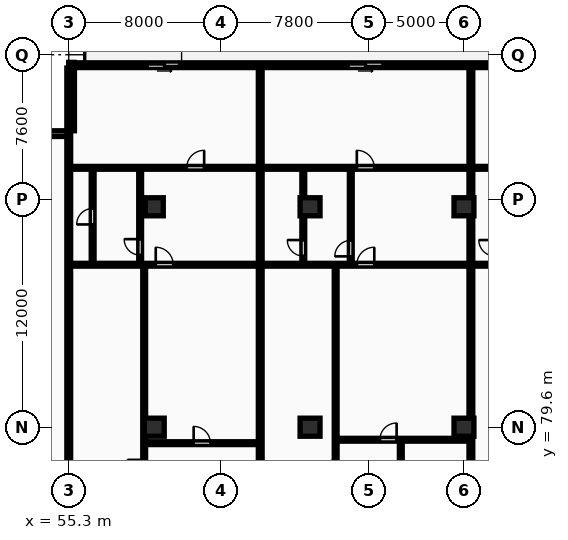
"""IFC4 building model, lengths in metres.
Left out: names, types, materials, properties, quantities, classifications, styles, units other than length and angle.
Written with IfcOpenShell. Run it as: python <this file> out.ifc"""

import sys

from ifc_helpers import new_model, si_unit, direction, frame, frame_2d, origin, origin_2d, place, context, subcontext, project, spatial, rectangle, circle, extrude, element, fill, save


model = new_model("IFC4")
c1 = context("Model", 3, precision=1e-05, world=origin(), true_north=direction((0.0, 1.0)))
c2 = subcontext(c1, "Body", "Model", "MODEL_VIEW")
j1 = project(units=[si_unit("LENGTHUNIT", "METRE"), si_unit("PLANEANGLEUNIT", "RADIAN")], contexts=[c1])
p1 = place(None, origin())
s1 = spatial("IfcSite", under=j1, at=p1, CompositionType="ELEMENT")
p2 = place(p1, origin())
s2 = spatial("IfcBuilding", under=s1, at=p2, CompositionType="ELEMENT")
p3 = place(p2, frame((0.0, 0.0, 24.0)))
s3 = spatial("IfcBuildingStorey", under=s2, at=p3, CompositionType="ELEMENT", Elevation=24.0)
p4 = place(p3, frame((59.8, 79.6, 0.0), z_axis=(0.0, 0.0, 1.0), x_axis=(1.0, 0.0, 0.0)))
e1 = element("IfcColumn", 1, at=p4, inside=s3, PredefinedType="COLUMN", context=c2, shape_type="SweptSolid", body=[
    extrude(rectangle(XDim=1.05, YDim=0.95, at=origin_2d()), origin(), (0.0, 0.0, 1.0), 3.25),
])
p5 = place(p3, frame((59.8, 91.2, 0.0), z_axis=(0.0, 0.0, 1.0), x_axis=(1.0, 0.0, 0.0)))
e2 = element("IfcColumn", 2, at=p5, inside=s3, PredefinedType="COLUMN", context=c2, shape_type="SweptSolid", body=[
    extrude(circle(Radius=0.475, at=origin_2d()), origin(), (0.0, 0.0, 1.0), 3.25),
])
for number, where, z_axis, x_axis in (
    (3, (68.0, 79.6, 0.0), (0.0, 0.0, 1.0), (1.0, 0.0, 0.0)),
    (4, (68.0, 91.2, 0.0), (0.0, 0.0, 1.0), (1.0, 0.0, 0.0)),
    (5, (76.1, 79.6, 0.0), (0.0, 0.0, 1.0), (1.0, 0.0, 0.0)),
    (6, (76.1, 91.2, 0.0), (0.0, 0.0, 1.0), (1.0, 0.0, 0.0)),
):
    element("IfcColumn", number, at=place(p3, frame(where, z_axis=z_axis, x_axis=x_axis)), inside=s3, PredefinedType="COLUMN", context=c2, shape_type="SweptSolid", body=[
        extrude(rectangle(XDim=1.05, YDim=0.95, at=origin_2d()), origin(), (0.0, 0.0, 1.0), 3.25),
    ])
p6 = place(p3, frame((132.9, 98.65, 0.0), z_axis=(0.0, 0.0, 1.0), x_axis=(-1.0, 0.0, 0.0)))
e7 = element("IfcWall", 7, at=p6, inside=s3, PredefinedType="STANDARD", context=c2, shape_type="SweptSolid", body=[
    extrude(rectangle(XDim=77.6, YDim=0.25, at=frame_2d((38.8, 0.0))), origin(), (0.0, 0.0, 1.0), 2.97),
])
p7 = place(p6, frame((71.661, 0.0, 0.0)))
e8 = element("IfcOpeningElement", 8, at=p7, cuts=e7, PredefinedType="OPENING", context=c2, shape_type="SweptSolid", body=[
    extrude(rectangle(XDim=1.8, YDim=2.2, at=frame_2d((0.9, 1.1))), frame((0.0, 0.135, 0.0), z_axis=(0.0, -1.0, 0.0), x_axis=(1.0, 0.0, 0.0)), (0.0, 0.0, 1.0), 0.27),
])
p8 = place(p6, frame((61.079, 0.0, 0.0)))
e9 = element("IfcOpeningElement", 9, at=p8, cuts=e7, PredefinedType="OPENING", context=c2, shape_type="SweptSolid", body=[
    extrude(rectangle(XDim=1.8, YDim=2.2, at=frame_2d((0.9, 1.1))), frame((0.0, 0.135, 0.0), z_axis=(0.0, -1.0, 0.0), x_axis=(1.0, 0.0, 0.0)), (0.0, 0.0, 1.0), 0.27),
])
p9 = place(p6, frame((50.498, 0.0, 0.0)))
e10 = element("IfcOpeningElement", 10, at=p9, cuts=e7, PredefinedType="OPENING", context=c2, shape_type="SweptSolid", body=[
    extrude(rectangle(XDim=1.8, YDim=2.2, at=frame_2d((0.9, 1.1))), frame((0.0, 0.135, 0.0), z_axis=(0.0, -1.0, 0.0), x_axis=(1.0, 0.0, 0.0)), (0.0, 0.0, 1.0), 0.27),
])
p10 = place(p6, frame((39.412, 0.0, 0.0)))
e11 = element("IfcOpeningElement", 11, at=p10, cuts=e7, PredefinedType="OPENING", context=c2, shape_type="SweptSolid", body=[
    extrude(rectangle(XDim=1.8, YDim=2.2, at=frame_2d((0.9, 1.1))), frame((0.0, 0.135, 0.0), z_axis=(0.0, -1.0, 0.0), x_axis=(1.0, 0.0, 0.0)), (0.0, 0.0, 1.0), 0.27),
])
p11 = place(p6, frame((28.326, 0.0, 0.0)))
e12 = element("IfcOpeningElement", 12, at=p11, cuts=e7, PredefinedType="OPENING", context=c2, shape_type="SweptSolid", body=[
    extrude(rectangle(XDim=1.8, YDim=2.2, at=frame_2d((0.9, 1.1))), frame((0.0, 0.135, 0.0), z_axis=(0.0, -1.0, 0.0), x_axis=(1.0, 0.0, 0.0)), (0.0, 0.0, 1.0), 0.27),
])
p12 = place(p6, frame((17.744, 0.0, 0.0)))
e13 = element("IfcOpeningElement", 13, at=p12, cuts=e7, PredefinedType="OPENING", context=c2, shape_type="SweptSolid", body=[
    extrude(rectangle(XDim=1.8, YDim=2.2, at=frame_2d((0.9, 1.1))), frame((0.0, 0.135, 0.0), z_axis=(0.0, -1.0, 0.0), x_axis=(1.0, 0.0, 0.0)), (0.0, 0.0, 1.0), 0.27),
])
p13 = place(p6, frame((6.901, 0.0, 0.0)))
e14 = element("IfcOpeningElement", 14, at=p13, cuts=e7, PredefinedType="OPENING", context=c2, shape_type="SweptSolid", body=[
    extrude(rectangle(XDim=1.8, YDim=2.2, at=frame_2d((0.9, 1.1))), frame((0.0, 0.135, 0.0), z_axis=(0.0, -1.0, 0.0), x_axis=(1.0, 0.0, 0.0)), (0.0, 0.0, 1.0), 0.27),
])
p14 = place(p6, frame((0.6, 0.0, 0.85)))
e15 = element("IfcOpeningElement", 15, at=p14, cuts=e7, PredefinedType="OPENING", context=c2, shape_type="SweptSolid", body=[
    extrude(rectangle(XDim=1.8, YDim=1.8, at=frame_2d((0.9, 0.9))), frame((0.0, 0.135, 0.0), z_axis=(0.0, -1.0, 0.0), x_axis=(1.0, 0.0, 0.0)), (0.0, 0.0, 1.0), 0.27),
])
for number, where, z_axis, x_axis in (
    (16, (55.45, 98.8, 0.0), (0.0, 0.0, 1.0), (0.0, -1.0, 0.0)),
    (17, (55.3, 95.05, 0.0), (0.0, 0.0, 1.0), (-1.0, 0.0, 0.0)),
):
    element("IfcWall", number, at=place(p3, frame(where, z_axis=z_axis, x_axis=x_axis)), inside=s3, PredefinedType="STANDARD", context=c2, shape_type="SweptSolid", body=[
        extrude(rectangle(XDim=3.6, YDim=0.3, at=frame_2d((1.8, 0.0))), origin(), (0.0, 0.0, 1.0), 2.97),
    ])
for number, where, z_axis, x_axis in (
    (18, (55.3, 69.43, 0.0), (0.0, 0.0, 1.0), (0.0, 1.0, 0.0)),
    (19, (65.378, 69.43, 0.0), (0.0, 0.0, 1.0), (0.0, 1.0, 0.0)),
):
    element("IfcWall", number, at=place(p3, frame(where, z_axis=z_axis, x_axis=x_axis)), inside=s3, PredefinedType="PARTITIONING", context=c2, shape_type="SweptSolid", body=[
        extrude(rectangle(XDim=29.07, YDim=0.2, at=frame_2d((14.535, 0.0))), origin(), (0.0, 0.0, 1.0), 2.97),
    ])
p15 = place(p3, frame((59.33, 78.76, 0.0), z_axis=(0.0, 0.0, 1.0), x_axis=(1.0, 0.0, 0.0)))
e20 = element("IfcWall", 20, at=p15, inside=s3, PredefinedType="PARTITIONING", context=c2, shape_type="SweptSolid", body=[
    extrude(rectangle(XDim=5.968, YDim=0.15, at=frame_2d((2.984, 0.0))), origin(), (0.0, 0.0, 1.0), 2.97),
])
p16 = place(p15, frame((2.544, 0.0, 0.0)))
e21 = element("IfcOpeningElement", 21, at=p16, cuts=e20, PredefinedType="OPENING", context=c2, shape_type="SweptSolid", body=[
    extrude(rectangle(XDim=0.88, YDim=2.06, at=frame_2d((0.44, 1.03))), frame((0.0, 0.085, 0.0), z_axis=(0.0, -1.0, 0.0), x_axis=(1.0, 0.0, 0.0)), (0.0, 0.0, 1.0), 0.17),
])
p17 = place(p3, frame((59.27, 69.41, 0.0), z_axis=(0.0, 0.0, 1.0), x_axis=(0.0, 1.0, 0.0)))
e22 = element("IfcWall", 22, at=p17, inside=s3, PredefinedType="PARTITIONING", context=c2, shape_type="SweptSolid", body=[
    extrude(rectangle(XDim=18.7, YDim=0.15, at=frame_2d((9.35, 0.0))), origin(), (0.0, 0.0, 1.0), 2.97),
])
p18 = place(p17, frame((7.59, 0.0, 0.0)))
e23 = element("IfcOpeningElement", 23, at=p18, cuts=e22, PredefinedType="OPENING", context=c2, shape_type="SweptSolid", body=[
    extrude(rectangle(XDim=0.88, YDim=2.06, at=frame_2d((0.44, 1.03))), frame((0.0, 0.085, 0.0), z_axis=(0.0, -1.0, 0.0), x_axis=(1.0, 0.0, 0.0)), (0.0, 0.0, 1.0), 0.17),
])
p19 = place(p3, frame((56.558, 88.19, 0.0), z_axis=(0.0, 0.0, 1.0), x_axis=(0.0, 1.0, 0.0)))
e24 = element("IfcWall", 24, at=p19, inside=s3, PredefinedType="PARTITIONING", context=c2, shape_type="SweptSolid", body=[
    extrude(rectangle(XDim=5.0, YDim=0.15, at=frame_2d((2.5, 0.0))), origin(), (0.0, 0.0, 1.0), 2.97),
])
p20 = place(p19, frame((2.08, 0.0, 0.0)))
e25 = element("IfcOpeningElement", 25, at=p20, cuts=e24, PredefinedType="OPENING", context=c2, shape_type="SweptSolid", body=[
    extrude(rectangle(XDim=0.84, YDim=2.04, at=frame_2d((0.42, 1.02))), frame((0.0, 0.085, 0.0), z_axis=(0.0, -1.0, 0.0), x_axis=(1.0, 0.0, 0.0)), (0.0, 0.0, 1.0), 0.17),
])
p21 = place(p3, frame((59.058, 88.19, 0.0), z_axis=(0.0, 0.0, 1.0), x_axis=(0.0, 1.0, 0.0)))
e26 = element("IfcWall", 26, at=p21, inside=s3, PredefinedType="PARTITIONING", context=c2, shape_type="SweptSolid", body=[
    extrude(rectangle(XDim=5.0, YDim=0.15, at=frame_2d((2.5, 0.0))), origin(), (0.0, 0.0, 1.0), 2.97),
])
p22 = place(p21, frame((0.467, 0.0, 0.0)))
e27 = element("IfcOpeningElement", 27, at=p22, cuts=e26, PredefinedType="OPENING", context=c2, shape_type="SweptSolid", body=[
    extrude(rectangle(XDim=0.84, YDim=2.04, at=frame_2d((0.42, 1.02))), frame((0.0, 0.085, 0.0), z_axis=(0.0, -1.0, 0.0), x_axis=(1.0, 0.0, 0.0)), (0.0, 0.0, 1.0), 0.17),
])
p23 = place(p3, frame((55.38, 88.15, 0.0), z_axis=(0.0, 0.0, 1.0), x_axis=(1.0, 0.0, 0.0)))
e28 = element("IfcWall", 28, at=p23, inside=s3, PredefinedType="PARTITIONING", context=c2, shape_type="SweptSolid", body=[
    extrude(rectangle(XDim=9.918, YDim=0.15, at=frame_2d((4.959, 0.0))), origin(), (0.0, 0.0, 1.0), 2.97),
])
p24 = place(p23, frame((4.499, 0.0, 0.0)))
e29 = element("IfcOpeningElement", 29, at=p24, cuts=e28, PredefinedType="OPENING", context=c2, shape_type="SweptSolid", body=[
    extrude(rectangle(XDim=0.92, YDim=2.08, at=frame_2d((0.46, 1.04))), frame((0.0, 0.085, 0.0), z_axis=(0.0, -1.0, 0.0), x_axis=(1.0, 0.0, 0.0)), (0.0, 0.0, 1.0), 0.17),
])
p25 = place(p3, frame((55.38, 93.25, 0.0), z_axis=(0.0, 0.0, 1.0), x_axis=(1.0, 0.0, 0.0)))
e30 = element("IfcWall", 30, at=p25, inside=s3, PredefinedType="PARTITIONING", context=c2, shape_type="SweptSolid", body=[
    extrude(rectangle(XDim=9.918, YDim=0.15, at=frame_2d((4.959, 0.0))), origin(), (0.0, 0.0, 1.0), 2.97),
])
p26 = place(p25, frame((6.127, 0.0, 0.0)))
e31 = element("IfcOpeningElement", 31, at=p26, cuts=e30, PredefinedType="OPENING", context=c2, shape_type="SweptSolid", body=[
    extrude(rectangle(XDim=0.92, YDim=2.08, at=frame_2d((0.46, 1.04))), frame((0.0, 0.085, 0.0), z_axis=(0.0, -1.0, 0.0), x_axis=(1.0, 0.0, 0.0)), (0.0, 0.0, 1.0), 0.17),
])
p27 = place(p3, frame((76.464, 69.43, 0.0), z_axis=(0.0, 0.0, 1.0), x_axis=(0.0, 1.0, 0.0)))
e32 = element("IfcWall", 32, at=p27, inside=s3, PredefinedType="PARTITIONING", context=c2, shape_type="SweptSolid", body=[
    extrude(rectangle(XDim=29.07, YDim=0.2, at=frame_2d((14.535, 0.0))), origin(), (0.0, 0.0, 1.0), 2.22),
])
p28 = place(p3, frame((72.776, 69.41, 0.0), z_axis=(0.0, 0.0, 1.0), x_axis=(0.0, 1.0, 0.0)))
e33 = element("IfcWall", 33, at=p28, inside=s3, PredefinedType="PARTITIONING", context=c2, shape_type="SweptSolid", body=[
    extrude(rectangle(XDim=9.53, YDim=0.15, at=frame_2d((4.765, 0.0))), origin(), (0.0, 0.0, 1.0), 2.97),
])
p29 = place(p28, frame((4.345, 0.0, 0.0)))
e34 = element("IfcOpeningElement", 34, at=p29, cuts=e33, PredefinedType="OPENING", context=c2, shape_type="SweptSolid", body=[
    extrude(rectangle(XDim=0.84, YDim=2.04, at=frame_2d((0.42, 1.02))), frame((0.0, 0.085, 0.0), z_axis=(0.0, -1.0, 0.0), x_axis=(1.0, 0.0, 0.0)), (0.0, 0.0, 1.0), 0.17),
])
p30 = place(p3, frame((69.408, 78.94, 0.0), z_axis=(0.0, 0.0, 1.0), x_axis=(1.0, 0.0, 0.0)))
e35 = element("IfcWall", 35, at=p30, inside=s3, PredefinedType="PARTITIONING", context=c2, shape_type="SweptSolid", body=[
    extrude(rectangle(XDim=6.976, YDim=0.15, at=frame_2d((3.488, 0.0))), origin(), (0.0, 0.0, 1.0), 2.97),
])
p31 = place(p30, frame((2.268, 0.0, 0.0)))
e36 = element("IfcOpeningElement", 36, at=p31, cuts=e35, PredefinedType="OPENING", context=c2, shape_type="SweptSolid", body=[
    extrude(rectangle(XDim=0.88, YDim=2.06, at=frame_2d((0.44, 1.03))), frame((0.0, 0.085, 0.0), z_axis=(0.0, -1.0, 0.0), x_axis=(1.0, 0.0, 0.0)), (0.0, 0.0, 1.0), 0.17),
])
p32 = place(p3, frame((69.348, 69.41, 0.0), z_axis=(0.0, 0.0, 1.0), x_axis=(0.0, 1.0, 0.0)))
e37 = element("IfcWall", 37, at=p32, inside=s3, PredefinedType="PARTITIONING", context=c2, shape_type="SweptSolid", body=[
    extrude(rectangle(XDim=18.7, YDim=0.15, at=frame_2d((9.35, 0.0))), origin(), (0.0, 0.0, 1.0), 2.97),
])
p33 = place(p32, frame((7.595, 0.0, 0.0)))
e38 = element("IfcOpeningElement", 38, at=p33, cuts=e37, PredefinedType="OPENING", context=c2, shape_type="SweptSolid", body=[
    extrude(rectangle(XDim=0.88, YDim=2.06, at=frame_2d((0.44, 1.03))), frame((0.0, 0.085, 0.0), z_axis=(0.0, -1.0, 0.0), x_axis=(1.0, 0.0, 0.0)), (0.0, 0.0, 1.0), 0.17),
])
p34 = place(p3, frame((67.644, 88.19, 0.0), z_axis=(0.0, 0.0, 1.0), x_axis=(0.0, 1.0, 0.0)))
e39 = element("IfcWall", 39, at=p34, inside=s3, PredefinedType="PARTITIONING", context=c2, shape_type="SweptSolid", body=[
    extrude(rectangle(XDim=5.0, YDim=0.15, at=frame_2d((2.5, 0.0))), origin(), (0.0, 0.0, 1.0), 2.22),
])
p35 = place(p34, frame((0.419, 0.0, 0.0)))
e40 = element("IfcOpeningElement", 40, at=p35, cuts=e39, PredefinedType="OPENING", context=c2, shape_type="SweptSolid", body=[
    extrude(rectangle(XDim=0.84, YDim=2.04, at=frame_2d((0.42, 1.02))), frame((0.0, 0.085, 0.0), z_axis=(0.0, -1.0, 0.0), x_axis=(1.0, 0.0, 0.0)), (0.0, 0.0, 1.0), 0.17),
])
p36 = place(p3, frame((70.144, 88.19, 0.0), z_axis=(0.0, 0.0, 1.0), x_axis=(0.0, 1.0, 0.0)))
e41 = element("IfcWall", 41, at=p36, inside=s3, PredefinedType="PARTITIONING", context=c2, shape_type="SweptSolid", body=[
    extrude(rectangle(XDim=5.0, YDim=0.15, at=frame_2d((2.5, 0.0))), origin(), (0.0, 0.0, 1.0), 2.97),
])
p37 = place(p36, frame((0.4, 0.0, 0.0)))
e42 = element("IfcOpeningElement", 42, at=p37, cuts=e41, PredefinedType="OPENING", context=c2, shape_type="SweptSolid", body=[
    extrude(rectangle(XDim=0.84, YDim=2.04, at=frame_2d((0.42, 1.02))), frame((0.0, 0.085, 0.0), z_axis=(0.0, -1.0, 0.0), x_axis=(1.0, 0.0, 0.0)), (0.0, 0.0, 1.0), 0.17),
])
p38 = place(p3, frame((65.458, 88.15, 0.0), z_axis=(0.0, 0.0, 1.0), x_axis=(1.0, 0.0, 0.0)))
e43 = element("IfcWall", 43, at=p38, inside=s3, PredefinedType="PARTITIONING", context=c2, shape_type="SweptSolid", body=[
    extrude(rectangle(XDim=10.926, YDim=0.15, at=frame_2d((5.463, 0.0))), origin(), (0.0, 0.0, 1.0), 2.97),
])
p39 = place(p38, frame((5.003, 0.0, 0.0)))
e44 = element("IfcOpeningElement", 44, at=p39, cuts=e43, PredefinedType="OPENING", context=c2, shape_type="SweptSolid", body=[
    extrude(rectangle(XDim=0.92, YDim=2.08, at=frame_2d((0.46, 1.04))), frame((0.0, 0.085, 0.0), z_axis=(0.0, -1.0, 0.0), x_axis=(1.0, 0.0, 0.0)), (0.0, 0.0, 1.0), 0.17),
])
p40 = place(p3, frame((65.458, 93.25, 0.0), z_axis=(0.0, 0.0, 1.0), x_axis=(1.0, 0.0, 0.0)))
e45 = element("IfcWall", 45, at=p40, inside=s3, PredefinedType="PARTITIONING", context=c2, shape_type="SweptSolid", body=[
    extrude(rectangle(XDim=10.926, YDim=0.15, at=frame_2d((5.463, 0.0))), origin(), (0.0, 0.0, 1.0), 2.97),
])
p41 = place(p40, frame((5.003, 0.0, 0.0)))
e46 = element("IfcOpeningElement", 46, at=p41, cuts=e45, PredefinedType="OPENING", context=c2, shape_type="SweptSolid", body=[
    extrude(rectangle(XDim=0.92, YDim=2.08, at=frame_2d((0.46, 1.04))), frame((0.0, 0.085, 0.0), z_axis=(0.0, -1.0, 0.0), x_axis=(1.0, 0.0, 0.0)), (0.0, 0.0, 1.0), 0.17),
])
p42 = place(p3, frame((76.544, 88.15, 0.0), z_axis=(0.0, 0.0, 1.0), x_axis=(1.0, 0.0, 0.0)))
e47 = element("IfcWall", 47, at=p42, inside=s3, PredefinedType="PARTITIONING", context=c2, shape_type="SweptSolid", body=[
    extrude(rectangle(XDim=9.918, YDim=0.15, at=frame_2d((4.959, 0.0))), origin(), (0.0, 0.0, 1.0), 2.97),
])
p43 = place(p42, frame((4.499, 0.0, 0.0)))
e48 = element("IfcOpeningElement", 48, at=p43, cuts=e47, PredefinedType="OPENING", context=c2, shape_type="SweptSolid", body=[
    extrude(rectangle(XDim=0.92, YDim=2.08, at=frame_2d((0.46, 1.04))), frame((0.0, 0.085, 0.0), z_axis=(0.0, -1.0, 0.0), x_axis=(1.0, 0.0, 0.0)), (0.0, 0.0, 1.0), 0.17),
])
p44 = place(p3, frame((76.544, 93.25, 0.0), z_axis=(0.0, 0.0, 1.0), x_axis=(1.0, 0.0, 0.0)))
e49 = element("IfcWall", 49, at=p44, inside=s3, PredefinedType="PARTITIONING", context=c2, shape_type="SweptSolid", body=[
    extrude(rectangle(XDim=9.918, YDim=0.15, at=frame_2d((4.959, 0.0))), origin(), (0.0, 0.0, 1.0), 2.97),
])
p45 = place(p44, frame((4.499, 0.0, 0.0)))
e50 = element("IfcOpeningElement", 50, at=p45, cuts=e49, PredefinedType="OPENING", context=c2, shape_type="SweptSolid", body=[
    extrude(rectangle(XDim=0.92, YDim=2.08, at=frame_2d((0.46, 1.04))), frame((0.0, 0.085, 0.0), z_axis=(0.0, -1.0, 0.0), x_axis=(1.0, 0.0, 0.0)), (0.0, 0.0, 1.0), 0.17),
])
p46 = place(p7, origin())
e51 = element("IfcDoor", 51, at=p46, inside=s3, OperationType="SLIDING_TO_LEFT", PredefinedType="DOOR", context=c2, shape_type="SweptSolid", body=[
    extrude(rectangle(XDim=1.8, YDim=2.2, at=frame_2d((0.9, 1.1))), frame((0.0, 0.025, 0.0), z_axis=(0.0, -1.0, 0.0), x_axis=(1.0, 0.0, 0.0)), (0.0, 0.0, 1.0), 0.05),
])
fill(e8, e51)
p47 = place(p8, origin())
e52 = element("IfcDoor", 52, at=p47, inside=s3, OperationType="SLIDING_TO_LEFT", PredefinedType="DOOR", context=c2, shape_type="SweptSolid", body=[
    extrude(rectangle(XDim=1.8, YDim=2.2, at=frame_2d((0.9, 1.1))), frame((0.0, 0.025, 0.0), z_axis=(0.0, -1.0, 0.0), x_axis=(1.0, 0.0, 0.0)), (0.0, 0.0, 1.0), 0.05),
])
fill(e9, e52)
p48 = place(p16, origin())
e53 = element("IfcDoor", 53, at=p48, inside=s3, OperationType="SINGLE_SWING_LEFT", PredefinedType="DOOR", context=c2, shape_type="SweptSolid", body=[
    extrude(rectangle(XDim=0.88, YDim=2.06, at=frame_2d((0.44, 1.03))), frame((0.0, 0.025, 0.0), z_axis=(0.0, -1.0, 0.0), x_axis=(1.0, 0.0, 0.0)), (0.0, 0.0, 1.0), 0.05),
])
fill(e21, e53)
p49 = place(p18, origin())
e54 = element("IfcDoor", 54, at=p49, inside=s3, OperationType="SINGLE_SWING_RIGHT", PredefinedType="DOOR", context=c2, shape_type="SweptSolid", body=[
    extrude(rectangle(XDim=0.88, YDim=2.06, at=frame_2d((0.44, 1.03))), frame((0.0, 0.025, 0.0), z_axis=(0.0, -1.0, 0.0), x_axis=(1.0, 0.0, 0.0)), (0.0, 0.0, 1.0), 0.05),
])
fill(e23, e54)
p50 = place(p20, origin())
e55 = element("IfcDoor", 55, at=p50, inside=s3, OperationType="SINGLE_SWING_LEFT", PredefinedType="DOOR", context=c2, shape_type="SweptSolid", body=[
    extrude(rectangle(XDim=0.84, YDim=2.04, at=frame_2d((0.42, 1.02))), frame((0.0, 0.025, 0.0), z_axis=(0.0, -1.0, 0.0), x_axis=(1.0, 0.0, 0.0)), (0.0, 0.0, 1.0), 0.05),
])
fill(e25, e55)
p51 = place(p22, origin())
e56 = element("IfcDoor", 56, at=p51, inside=s3, OperationType="SINGLE_SWING_RIGHT", PredefinedType="DOOR", context=c2, shape_type="SweptSolid", body=[
    extrude(rectangle(XDim=0.84, YDim=2.04, at=frame_2d((0.42, 1.02))), frame((0.0, 0.025, 0.0), z_axis=(0.0, -1.0, 0.0), x_axis=(1.0, 0.0, 0.0)), (0.0, 0.0, 1.0), 0.05),
])
fill(e27, e56)
p52 = place(p24, origin())
e57 = element("IfcDoor", 57, at=p52, inside=s3, OperationType="SINGLE_SWING_LEFT", PredefinedType="DOOR", context=c2, shape_type="SweptSolid", body=[
    extrude(rectangle(XDim=0.92, YDim=2.08, at=frame_2d((0.46, 1.04))), frame((0.0, 0.025, 0.0), z_axis=(0.0, -1.0, 0.0), x_axis=(1.0, 0.0, 0.0)), (0.0, 0.0, 1.0), 0.05),
])
fill(e29, e57)
p53 = place(p26, origin())
e58 = element("IfcDoor", 58, at=p53, inside=s3, OperationType="SINGLE_SWING_RIGHT", PredefinedType="DOOR", context=c2, shape_type="SweptSolid", body=[
    extrude(rectangle(XDim=0.92, YDim=2.08, at=frame_2d((0.46, 1.04))), frame((0.0, 0.025, 0.0), z_axis=(0.0, -1.0, 0.0), x_axis=(1.0, 0.0, 0.0)), (0.0, 0.0, 1.0), 0.05),
])
fill(e31, e58)
p54 = place(p31, origin())
e59 = element("IfcDoor", 59, at=p54, inside=s3, OperationType="SINGLE_SWING_RIGHT", PredefinedType="DOOR", context=c2, shape_type="SweptSolid", body=[
    extrude(rectangle(XDim=0.88, YDim=2.06, at=frame_2d((0.44, 1.03))), frame((0.0, 0.025, 0.0), z_axis=(0.0, -1.0, 0.0), x_axis=(1.0, 0.0, 0.0)), (0.0, 0.0, 1.0), 0.05),
])
fill(e36, e59)
p55 = place(p33, origin())
e60 = element("IfcDoor", 60, at=p55, inside=s3, OperationType="SINGLE_SWING_LEFT", PredefinedType="DOOR", context=c2, shape_type="SweptSolid", body=[
    extrude(rectangle(XDim=0.88, YDim=2.06, at=frame_2d((0.44, 1.03))), frame((0.0, 0.025, 0.0), z_axis=(0.0, -1.0, 0.0), x_axis=(1.0, 0.0, 0.0)), (0.0, 0.0, 1.0), 0.05),
])
fill(e38, e60)
p56 = place(p35, origin())
e61 = element("IfcDoor", 61, at=p56, inside=s3, OperationType="SINGLE_SWING_RIGHT", PredefinedType="DOOR", context=c2, shape_type="SweptSolid", body=[
    extrude(rectangle(XDim=0.84, YDim=2.04, at=frame_2d((0.42, 1.02))), frame((0.0, 0.025, 0.0), z_axis=(0.0, -1.0, 0.0), x_axis=(1.0, 0.0, 0.0)), (0.0, 0.0, 1.0), 0.05),
])
fill(e40, e61)
p57 = place(p37, origin())
e62 = element("IfcDoor", 62, at=p57, inside=s3, OperationType="SINGLE_SWING_LEFT", PredefinedType="DOOR", context=c2, shape_type="SweptSolid", body=[
    extrude(rectangle(XDim=0.84, YDim=2.04, at=frame_2d((0.42, 1.02))), frame((0.0, 0.025, 0.0), z_axis=(0.0, -1.0, 0.0), x_axis=(1.0, 0.0, 0.0)), (0.0, 0.0, 1.0), 0.05),
])
fill(e42, e62)
p58 = place(p39, origin())
e63 = element("IfcDoor", 63, at=p58, inside=s3, OperationType="SINGLE_SWING_RIGHT", PredefinedType="DOOR", context=c2, shape_type="SweptSolid", body=[
    extrude(rectangle(XDim=0.92, YDim=2.08, at=frame_2d((0.46, 1.04))), frame((0.0, 0.025, 0.0), z_axis=(0.0, -1.0, 0.0), x_axis=(1.0, 0.0, 0.0)), (0.0, 0.0, 1.0), 0.05),
])
fill(e44, e63)
p59 = place(p41, origin())
e64 = element("IfcDoor", 64, at=p59, inside=s3, OperationType="SINGLE_SWING_LEFT", PredefinedType="DOOR", context=c2, shape_type="SweptSolid", body=[
    extrude(rectangle(XDim=0.92, YDim=2.08, at=frame_2d((0.46, 1.04))), frame((0.0, 0.025, 0.0), z_axis=(0.0, -1.0, 0.0), x_axis=(1.0, 0.0, 0.0)), (0.0, 0.0, 1.0), 0.05),
])
fill(e46, e64)
save(model, sys.argv[1])
